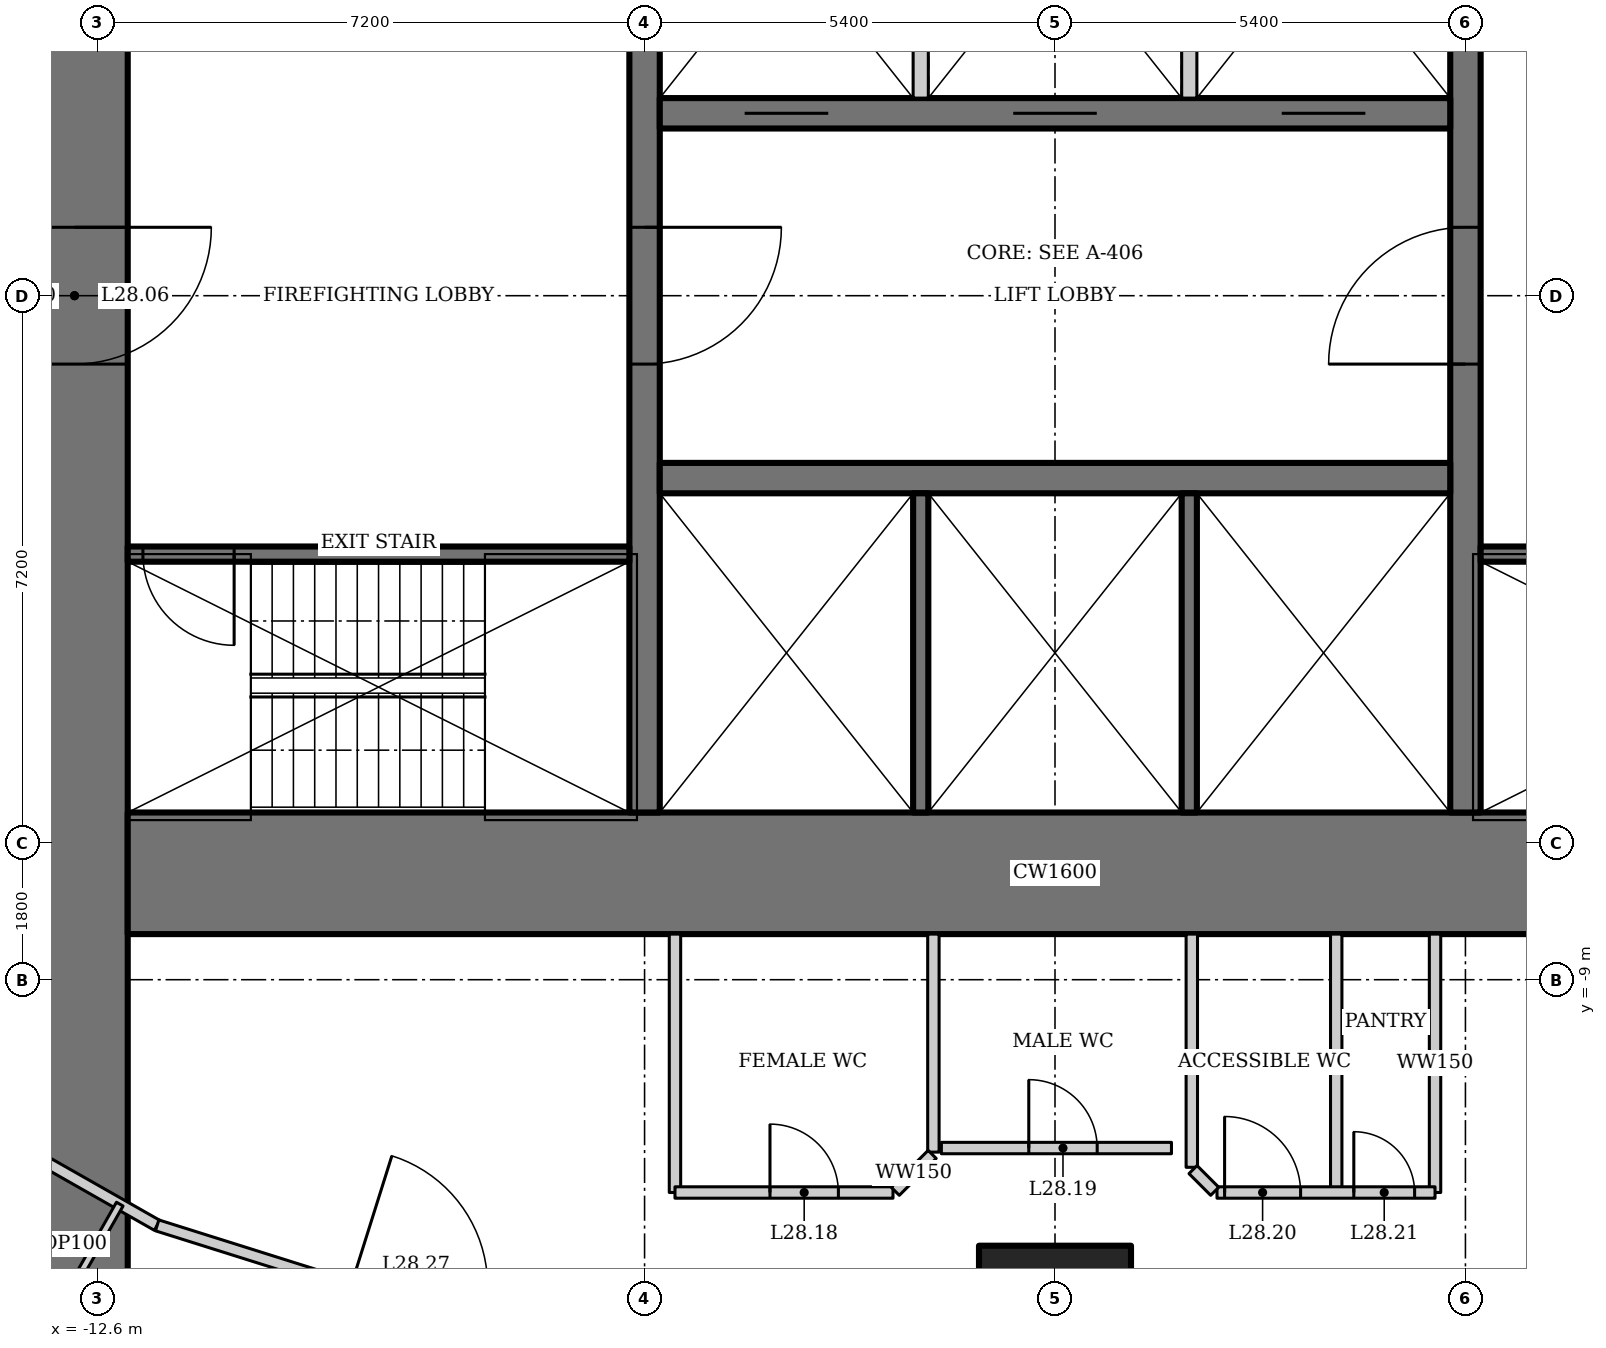
"""IFC4 building model, lengths in metres.
Left out: names, types, materials, properties, quantities, classifications, styles, units other than length and angle.
Written with IfcOpenShell. Run it as: python <this file> out.ifc"""

import sys

from ifc_helpers import new_model, si_unit, direction, frame, frame_2d, origin, origin_2d, place, context, subcontext, project, spatial, rectangle, hollow_rectangle, extrude, element, fill, save


model = new_model("IFC4")
c1 = context("Model", 3, precision=1e-05, world=origin(), true_north=direction((0.0, 1.0)))
c2 = subcontext(c1, "Body", "Model", "MODEL_VIEW")
j1 = project(units=[si_unit("LENGTHUNIT", "METRE"), si_unit("PLANEANGLEUNIT", "RADIAN")], contexts=[c1])
p1 = place(None, origin())
s1 = spatial("IfcSite", under=j1, at=p1, CompositionType="ELEMENT")
p2 = place(p1, origin())
s2 = spatial("IfcBuilding", under=s1, at=p2, CompositionType="ELEMENT")
p3 = place(p2, frame((0.0, 0.0, 121.6)))
s3 = spatial("IfcBuildingStorey", under=s2, at=p3, CompositionType="ELEMENT", Elevation=121.6)
p4 = place(p3, frame((0.0, -13.5, 0.0), z_axis=(0.0, 0.0, 1.0), x_axis=(1.0, 0.0, 0.0)))
e1 = element("IfcColumn", 1, at=p4, inside=s3, PredefinedType="COLUMN", context=c2, shape_type="SweptSolid", body=[
    extrude(hollow_rectangle(XDim=2.0, YDim=2.0, WallThickness=0.17, at=origin_2d()), origin(), (0.0, 0.0, 1.0), 4.2),
])
p5 = place(p3, frame((-12.9, 13.0, 0.0), z_axis=(0.0, 0.0, 1.0), x_axis=(0.0, -1.0, 0.0)))
e2 = element("IfcWall", 2, at=p5, inside=s3, PredefinedType="SHEAR", context=c2, shape_type="SweptSolid", body=[
    extrude(rectangle(XDim=26.0, YDim=1.4, at=frame_2d((13.0, 0.0))), origin(), (0.0, 0.0, 1.0), 4.2),
])
p6 = place(p5, frame((12.1, 0.0, 0.0)))
e3 = element("IfcOpeningElement", 3, at=p6, cuts=e2, PredefinedType="OPENING", context=c2, shape_type="SweptSolid", body=[
    extrude(rectangle(XDim=1.8, YDim=2.1, at=frame_2d((0.9, 1.05))), frame((0.0, 0.71, 0.0), z_axis=(0.0, -1.0, 0.0), x_axis=(1.0, 0.0, 0.0)), (0.0, 0.0, 1.0), 1.42),
])
p7 = place(p3, frame((-12.2, -7.6, 0.0), z_axis=(0.0, 0.0, 1.0), x_axis=(1.0, 0.0, 0.0)))
e4 = element("IfcWall", 4, at=p7, inside=s3, PredefinedType="SHEAR", context=c2, shape_type="SweptSolid", body=[
    extrude(rectangle(XDim=24.4, YDim=1.6, at=frame_2d((12.2, 0.0))), origin(), (0.0, 0.0, 1.0), 4.2),
])
p8 = place(p3, frame((5.4, -6.8, 0.0), z_axis=(0.0, 0.0, 1.0), x_axis=(0.0, 1.0, 0.0)))
e5 = element("IfcWall", 5, at=p8, inside=s3, PredefinedType="SHEAR", context=c2, shape_type="SweptSolid", body=[
    extrude(rectangle(XDim=13.6, YDim=0.4, at=frame_2d((6.8, 0.0))), origin(), (0.0, 0.0, 1.0), 4.2),
])
p9 = place(p8, frame((5.9, 0.0, 0.0)))
e6 = element("IfcOpeningElement", 6, at=p9, cuts=e5, PredefinedType="OPENING", context=c2, shape_type="SweptSolid", body=[
    extrude(rectangle(XDim=1.8, YDim=2.1, at=frame_2d((0.9, 1.05))), frame((0.0, 0.21, 0.0), z_axis=(0.0, -1.0, 0.0), x_axis=(1.0, 0.0, 0.0)), (0.0, 0.0, 1.0), 0.42),
])
p10 = place(p3, frame((-5.4, 6.8, 0.0), z_axis=(0.0, 0.0, 1.0), x_axis=(0.0, -1.0, 0.0)))
e7 = element("IfcWall", 7, at=p10, inside=s3, PredefinedType="SHEAR", context=c2, shape_type="SweptSolid", body=[
    extrude(rectangle(XDim=13.6, YDim=0.4, at=frame_2d((6.8, 0.0))), origin(), (0.0, 0.0, 1.0), 4.2),
])
p11 = place(p10, frame((5.9, 0.0, 0.0)))
e8 = element("IfcOpeningElement", 8, at=p11, cuts=e7, PredefinedType="OPENING", context=c2, shape_type="SweptSolid", body=[
    extrude(rectangle(XDim=1.8, YDim=2.1, at=frame_2d((0.9, 1.05))), frame((0.0, 0.21, 0.0), z_axis=(0.0, -1.0, 0.0), x_axis=(1.0, 0.0, 0.0)), (0.0, 0.0, 1.0), 0.42),
])
p12 = place(p3, frame((-5.2, -2.4, 0.0), z_axis=(0.0, 0.0, 1.0), x_axis=(1.0, 0.0, 0.0)))
e9 = element("IfcWall", 9, at=p12, inside=s3, PredefinedType="SHEAR", context=c2, shape_type="SweptSolid", body=[
    extrude(rectangle(XDim=10.4, YDim=0.4, at=frame_2d((5.2, 0.0))), origin(), (0.0, 0.0, 1.0), 4.2),
])
for number, where, z_axis, x_axis in (
    (10, (-1.767, -2.6, 0.0), (0.0, 0.0, 1.0), (0.0, -1.0, 0.0)),
    (11, (1.767, -2.6, 0.0), (0.0, 0.0, 1.0), (0.0, -1.0, 0.0)),
):
    element("IfcWall", number, at=place(p3, frame(where, z_axis=z_axis, x_axis=x_axis)), inside=s3, PredefinedType="SOLIDWALL", context=c2, shape_type="SweptSolid", body=[
        extrude(rectangle(XDim=4.2, YDim=0.2, at=frame_2d((2.1, 0.0))), origin(), (0.0, 0.0, 1.0), 4.2),
    ])
p13 = place(p3, frame((5.2, 2.4, 0.0), z_axis=(0.0, 0.0, 1.0), x_axis=(-1.0, 0.0, 0.0)))
e12 = element("IfcWall", 12, at=p13, inside=s3, PredefinedType="SHEAR", context=c2, shape_type="SweptSolid", body=[
    extrude(rectangle(XDim=10.4, YDim=0.4, at=frame_2d((5.2, 0.0))), origin(), (0.0, 0.0, 1.0), 4.2),
])
p14 = place(p13, frame((8.183, 0.0, 0.0)))
e13 = element("IfcOpeningElement", 13, at=p14, cuts=e12, PredefinedType="OPENING", context=c2, shape_type="SweptSolid", body=[
    extrude(rectangle(XDim=1.1, YDim=2.2, at=frame_2d((0.55, 1.1))), frame((0.0, 0.21, 0.0), z_axis=(0.0, -1.0, 0.0), x_axis=(1.0, 0.0, 0.0)), (0.0, 0.0, 1.0), 0.42),
])
p15 = place(p13, frame((4.65, 0.0, 0.0)))
e14 = element("IfcOpeningElement", 14, at=p15, cuts=e12, PredefinedType="OPENING", context=c2, shape_type="SweptSolid", body=[
    extrude(rectangle(XDim=1.1, YDim=2.2, at=frame_2d((0.55, 1.1))), frame((0.0, 0.21, 0.0), z_axis=(0.0, -1.0, 0.0), x_axis=(1.0, 0.0, 0.0)), (0.0, 0.0, 1.0), 0.42),
])
p16 = place(p13, frame((1.117, 0.0, 0.0)))
e15 = element("IfcOpeningElement", 15, at=p16, cuts=e12, PredefinedType="OPENING", context=c2, shape_type="SweptSolid", body=[
    extrude(rectangle(XDim=1.1, YDim=2.2, at=frame_2d((0.55, 1.1))), frame((0.0, 0.21, 0.0), z_axis=(0.0, -1.0, 0.0), x_axis=(1.0, 0.0, 0.0)), (0.0, 0.0, 1.0), 0.42),
])
for number, where, z_axis, x_axis in (
    (16, (-1.767, 2.6, 0.0), (0.0, 0.0, 1.0), (0.0, 1.0, 0.0)),
    (17, (1.767, 2.6, 0.0), (0.0, 0.0, 1.0), (0.0, 1.0, 0.0)),
):
    element("IfcWall", number, at=place(p3, frame(where, z_axis=z_axis, x_axis=x_axis)), inside=s3, PredefinedType="SOLIDWALL", context=c2, shape_type="SweptSolid", body=[
        extrude(rectangle(XDim=4.2, YDim=0.2, at=frame_2d((2.1, 0.0))), origin(), (0.0, 0.0, 1.0), 4.2),
    ])
p17 = place(p3, frame((5.6, -3.4, 0.0), z_axis=(0.0, 0.0, 1.0), x_axis=(1.0, 0.0, 0.0)))
e18 = element("IfcWall", 18, at=p17, inside=s3, PredefinedType="SHEAR", context=c2, shape_type="SweptSolid", body=[
    extrude(rectangle(XDim=6.6, YDim=0.2, at=frame_2d((3.3, 0.0))), origin(), (0.0, 0.0, 1.0), 4.2),
])
p18 = place(p17, frame((5.2, 0.0, 0.0)))
e19 = element("IfcOpeningElement", 19, at=p18, cuts=e18, PredefinedType="OPENING", context=c2, shape_type="SweptSolid", body=[
    extrude(rectangle(XDim=1.2, YDim=2.1, at=frame_2d((0.6, 1.05))), frame((0.0, 0.11, 0.0), z_axis=(0.0, -1.0, 0.0), x_axis=(1.0, 0.0, 0.0)), (0.0, 0.0, 1.0), 0.22),
])
p19 = place(p3, frame((-5.6, -3.4, 0.0), z_axis=(0.0, 0.0, 1.0), x_axis=(-1.0, 0.0, 0.0)))
e20 = element("IfcWall", 20, at=p19, inside=s3, PredefinedType="SHEAR", context=c2, shape_type="SweptSolid", body=[
    extrude(rectangle(XDim=6.6, YDim=0.2, at=frame_2d((3.3, 0.0))), origin(), (0.0, 0.0, 1.0), 4.2),
])
p20 = place(p19, frame((5.2, 0.0, 0.0)))
e21 = element("IfcOpeningElement", 21, at=p20, cuts=e20, PredefinedType="OPENING", context=c2, shape_type="SweptSolid", body=[
    extrude(rectangle(XDim=1.2, YDim=2.1, at=frame_2d((0.6, 1.05))), frame((0.0, 0.11, 0.0), z_axis=(0.0, -1.0, 0.0), x_axis=(1.0, 0.0, 0.0)), (0.0, 0.0, 1.0), 0.22),
])
p21 = place(p3, frame((-16.623, -9.499, 0.0), z_axis=(0.0, 0.0, 1.0), x_axis=(0.869375991036, -0.494151177485, 0.0)))
e22 = element("IfcWall", 22, at=p21, inside=s3, PredefinedType="PARTITIONING", context=c2, shape_type="SweptSolid", body=[
    extrude(rectangle(XDim=5.532, YDim=0.15, at=frame_2d((2.766, 0.0))), origin(), (0.0, 0.0, 1.0), 4.05),
])
p22 = place(p3, frame((-11.813, -12.232, 0.0), z_axis=(0.0, 0.0, 1.0), x_axis=(0.953893934057, -0.300143903101, 0.0)))
e23 = element("IfcWall", 23, at=p22, inside=s3, PredefinedType="PARTITIONING", context=c2, shape_type="SweptSolid", body=[
    extrude(rectangle(XDim=5.042, YDim=0.15, at=frame_2d((2.521, 0.0))), origin(), (0.0, 0.0, 1.0), 4.05),
])
p23 = place(p22, frame((2.671, 0.0, 0.0)))
e24 = element("IfcOpeningElement", 24, at=p23, cuts=e23, PredefinedType="OPENING", context=c2, shape_type="SweptSolid", body=[
    extrude(rectangle(XDim=1.8, YDim=2.1, at=frame_2d((0.9, 1.05))), frame((0.0, 0.085, 0.0), z_axis=(0.0, -1.0, 0.0), x_axis=(1.0, 0.0, 0.0)), (0.0, 0.0, 1.0), 0.17),
])
for number, where, z_axis, x_axis in (
    (25, (-5.0, -8.4, 0.0), (0.0, 0.0, 1.0), (0.0, -1.0, 0.0)),
    (26, (5.0, -8.4, 0.0), (0.0, 0.0, 1.0), (0.0, -1.0, 0.0)),
    (27, (3.7, -8.4, 0.0), (0.0, 0.0, 1.0), (0.0, -1.0, 0.0)),
):
    element("IfcWall", number, at=place(p3, frame(where, z_axis=z_axis, x_axis=x_axis)), inside=s3, PredefinedType="SOLIDWALL", context=c2, shape_type="SweptSolid", body=[
        extrude(rectangle(XDim=3.4, YDim=0.15, at=frame_2d((1.7, 0.0))), origin(), (0.0, 0.0, 1.0), 4.05),
    ])
p24 = place(p3, frame((-12.9, -13.0, 0.0), z_axis=(0.0, 0.0, 1.0), x_axis=(0.494173075358, 0.869363543974, 0.0)))
e28 = element("IfcWall", 28, at=p24, inside=s3, PredefinedType="PARTITIONING", context=c2, shape_type="SweptSolid", body=[
    extrude(rectangle(XDim=1.204, YDim=0.1, at=frame_2d((0.602, 0.0))), origin(), (0.0, 0.0, 1.0), 4.05),
])
p25 = place(p3, frame((-5.0, -11.8, 0.0), z_axis=(0.0, 0.0, 1.0), x_axis=(1.0, 0.0, 0.0)))
e29 = element("IfcWall", 29, at=p25, inside=s3, PredefinedType="SOLIDWALL", context=c2, shape_type="SweptSolid", body=[
    extrude(rectangle(XDim=2.869, YDim=0.15, at=frame_2d((1.434, 0.0))), origin(), (0.0, 0.0, 1.0), 4.05),
])
p26 = place(p25, frame((1.25, 0.0, 0.0)))
e30 = element("IfcOpeningElement", 30, at=p26, cuts=e29, PredefinedType="OPENING", context=c2, shape_type="SweptSolid", body=[
    extrude(rectangle(XDim=0.9, YDim=2.1, at=frame_2d((0.45, 1.05))), frame((0.0, 0.085, 0.0), z_axis=(0.0, -1.0, 0.0), x_axis=(1.0, 0.0, 0.0)), (0.0, 0.0, 1.0), 0.17),
])
p27 = place(p3, frame((2.131, -11.8, 0.0), z_axis=(0.0, 0.0, 1.0), x_axis=(1.0, 0.0, 0.0)))
e31 = element("IfcWall", 31, at=p27, inside=s3, PredefinedType="SOLIDWALL", context=c2, shape_type="SweptSolid", body=[
    extrude(rectangle(XDim=2.869, YDim=0.15, at=frame_2d((1.434, 0.0))), origin(), (0.0, 0.0, 1.0), 4.05),
])
p28 = place(p27, frame((0.1, 0.0, 0.0)))
e32 = element("IfcOpeningElement", 32, at=p28, cuts=e31, PredefinedType="OPENING", context=c2, shape_type="SweptSolid", body=[
    extrude(rectangle(XDim=1.0, YDim=2.1, at=frame_2d((0.5, 1.05))), frame((0.0, 0.085, 0.0), z_axis=(0.0, -1.0, 0.0), x_axis=(1.0, 0.0, 0.0)), (0.0, 0.0, 1.0), 0.17),
])
p29 = place(p27, frame((1.8, 0.0, 0.0)))
e33 = element("IfcOpeningElement", 33, at=p29, cuts=e31, PredefinedType="OPENING", context=c2, shape_type="SweptSolid", body=[
    extrude(rectangle(XDim=0.8, YDim=2.1, at=frame_2d((0.4, 1.05))), frame((0.0, 0.085, 0.0), z_axis=(0.0, -1.0, 0.0), x_axis=(1.0, 0.0, 0.0)), (0.0, 0.0, 1.0), 0.17),
])
p30 = place(p3, frame((-1.6, -8.4, 0.0), z_axis=(0.0, 0.0, 1.0), x_axis=(0.0, -1.0, 0.0)))
e34 = element("IfcWall", 34, at=p30, inside=s3, PredefinedType="SOLIDWALL", context=c2, shape_type="SweptSolid", body=[
    extrude(rectangle(XDim=2.869, YDim=0.15, at=frame_2d((1.434, 0.0))), origin(), (0.0, 0.0, 1.0), 4.05),
])
p31 = place(p3, frame((1.8, -8.4, 0.0), z_axis=(0.0, 0.0, 1.0), x_axis=(0.0, -1.0, 0.0)))
e35 = element("IfcWall", 35, at=p31, inside=s3, PredefinedType="SOLIDWALL", context=c2, shape_type="SweptSolid", body=[
    extrude(rectangle(XDim=3.069, YDim=0.15, at=frame_2d((1.534, 0.0))), origin(), (0.0, 0.0, 1.0), 4.05),
])
p32 = place(p3, frame((-2.101, -11.784, 0.0), z_axis=(0.0, 0.0, 1.0), x_axis=(0.706928959799, 0.707284557867, 0.0)))
e36 = element("IfcWall", 36, at=p32, inside=s3, PredefinedType="SOLIDWALL", context=c2, shape_type="SweptSolid", body=[
    extrude(rectangle(XDim=0.687, YDim=0.15, at=frame_2d((0.343, 0.0))), origin(), (0.0, 0.0, 1.0), 4.05),
])
p33 = place(p3, frame((-1.495, -11.215, 0.0), z_axis=(0.0, 0.0, 1.0), x_axis=(1.0, 0.0, 0.0)))
e37 = element("IfcWall", 37, at=p33, inside=s3, PredefinedType="SOLIDWALL", context=c2, shape_type="SweptSolid", body=[
    extrude(rectangle(XDim=3.027, YDim=0.15, at=frame_2d((1.514, 0.0))), origin(), (0.0, 0.0, 1.0), 4.05),
])
p34 = place(p33, frame((1.15, 0.0, 0.0)))
e38 = element("IfcOpeningElement", 38, at=p34, cuts=e37, PredefinedType="OPENING", context=c2, shape_type="SweptSolid", body=[
    extrude(rectangle(XDim=0.9, YDim=2.1, at=frame_2d((0.45, 1.05))), frame((0.0, 0.085, 0.0), z_axis=(0.0, -1.0, 0.0), x_axis=(1.0, 0.0, 0.0)), (0.0, 0.0, 1.0), 0.17),
])
p35 = place(p3, frame((1.816, -11.499, 0.0), z_axis=(0.0, 0.0, 1.0), x_axis=(0.706804405012, -0.707409028113, 0.0)))
e39 = element("IfcWall", 39, at=p35, inside=s3, PredefinedType="SOLIDWALL", context=c2, shape_type="SweptSolid", body=[
    extrude(rectangle(XDim=0.404, YDim=0.15, at=frame_2d((0.202, 0.0))), origin(), (0.0, 0.0, 1.0), 4.05),
])
p36 = place(p9, origin())
e40 = element("IfcDoor", 40, at=p36, inside=s3, OperationType="DOUBLE_DOOR_DOUBLE_SWING", PredefinedType="DOOR", context=c2, shape_type="SweptSolid", body=[
    extrude(rectangle(XDim=1.8, YDim=2.1, at=frame_2d((0.9, 1.05))), frame((0.0, 0.025, 0.0), z_axis=(0.0, -1.0, 0.0), x_axis=(1.0, 0.0, 0.0)), (0.0, 0.0, 1.0), 0.05),
])
fill(e6, e40)
p37 = place(p11, origin())
e41 = element("IfcDoor", 41, at=p37, inside=s3, OperationType="DOUBLE_DOOR_DOUBLE_SWING", PredefinedType="DOOR", context=c2, shape_type="SweptSolid", body=[
    extrude(rectangle(XDim=1.8, YDim=2.1, at=frame_2d((0.9, 1.05))), frame((0.0, 0.025, 0.0), z_axis=(0.0, -1.0, 0.0), x_axis=(1.0, 0.0, 0.0)), (0.0, 0.0, 1.0), 0.05),
])
fill(e8, e41)
p38 = place(p20, origin())
e42 = element("IfcDoor", 42, at=p38, inside=s3, OperationType="SINGLE_SWING_RIGHT", PredefinedType="DOOR", context=c2, shape_type="SweptSolid", body=[
    extrude(rectangle(XDim=1.2, YDim=2.1, at=frame_2d((0.6, 1.05))), frame((0.0, 0.025, 0.0), z_axis=(0.0, -1.0, 0.0), x_axis=(1.0, 0.0, 0.0)), (0.0, 0.0, 1.0), 0.05),
])
fill(e21, e42)
p39 = place(p6, origin())
e43 = element("IfcDoor", 43, at=p39, inside=s3, OperationType="DOUBLE_DOOR_DOUBLE_SWING", PredefinedType="DOOR", context=c2, shape_type="SweptSolid", body=[
    extrude(rectangle(XDim=1.8, YDim=2.1, at=frame_2d((0.9, 1.05))), frame((0.0, 0.025, 0.0), z_axis=(0.0, -1.0, 0.0), x_axis=(1.0, 0.0, 0.0)), (0.0, 0.0, 1.0), 0.05),
])
fill(e3, e43)
p40 = place(p14, origin())
e44 = element("IfcDoor", 44, at=p40, inside=s3, OperationType="DOUBLE_DOOR_SLIDING", PredefinedType="DOOR", context=c2, shape_type="SweptSolid", body=[
    extrude(rectangle(XDim=1.1, YDim=2.2, at=frame_2d((0.55, 1.1))), frame((0.0, 0.025, 0.0), z_axis=(0.0, -1.0, 0.0), x_axis=(1.0, 0.0, 0.0)), (0.0, 0.0, 1.0), 0.05),
])
fill(e13, e44)
p41 = place(p15, origin())
e45 = element("IfcDoor", 45, at=p41, inside=s3, OperationType="DOUBLE_DOOR_SLIDING", PredefinedType="DOOR", context=c2, shape_type="SweptSolid", body=[
    extrude(rectangle(XDim=1.1, YDim=2.2, at=frame_2d((0.55, 1.1))), frame((0.0, 0.025, 0.0), z_axis=(0.0, -1.0, 0.0), x_axis=(1.0, 0.0, 0.0)), (0.0, 0.0, 1.0), 0.05),
])
fill(e14, e45)
p42 = place(p16, origin())
e46 = element("IfcDoor", 46, at=p42, inside=s3, OperationType="DOUBLE_DOOR_SLIDING", PredefinedType="DOOR", context=c2, shape_type="SweptSolid", body=[
    extrude(rectangle(XDim=1.1, YDim=2.2, at=frame_2d((0.55, 1.1))), frame((0.0, 0.025, 0.0), z_axis=(0.0, -1.0, 0.0), x_axis=(1.0, 0.0, 0.0)), (0.0, 0.0, 1.0), 0.05),
])
fill(e15, e46)
p43 = place(p26, origin())
e47 = element("IfcDoor", 47, at=p43, inside=s3, OperationType="SINGLE_SWING_LEFT", PredefinedType="DOOR", context=c2, shape_type="SweptSolid", body=[
    extrude(rectangle(XDim=0.9, YDim=2.1, at=frame_2d((0.45, 1.05))), frame((0.0, 0.025, 0.0), z_axis=(0.0, -1.0, 0.0), x_axis=(1.0, 0.0, 0.0)), (0.0, 0.0, 1.0), 0.05),
])
fill(e30, e47)
p44 = place(p34, origin())
e48 = element("IfcDoor", 48, at=p44, inside=s3, OperationType="SINGLE_SWING_LEFT", PredefinedType="DOOR", context=c2, shape_type="SweptSolid", body=[
    extrude(rectangle(XDim=0.9, YDim=2.1, at=frame_2d((0.45, 1.05))), frame((0.0, 0.025, 0.0), z_axis=(0.0, -1.0, 0.0), x_axis=(1.0, 0.0, 0.0)), (0.0, 0.0, 1.0), 0.05),
])
fill(e38, e48)
p45 = place(p28, origin())
e49 = element("IfcDoor", 49, at=p45, inside=s3, OperationType="SINGLE_SWING_LEFT", PredefinedType="DOOR", context=c2, shape_type="SweptSolid", body=[
    extrude(rectangle(XDim=1.0, YDim=2.1, at=frame_2d((0.5, 1.05))), frame((0.0, 0.025, 0.0), z_axis=(0.0, -1.0, 0.0), x_axis=(1.0, 0.0, 0.0)), (0.0, 0.0, 1.0), 0.05),
])
fill(e32, e49)
p46 = place(p29, origin())
e50 = element("IfcDoor", 50, at=p46, inside=s3, OperationType="SINGLE_SWING_LEFT", PredefinedType="DOOR", context=c2, shape_type="SweptSolid", body=[
    extrude(rectangle(XDim=0.8, YDim=2.1, at=frame_2d((0.4, 1.05))), frame((0.0, 0.025, 0.0), z_axis=(0.0, -1.0, 0.0), x_axis=(1.0, 0.0, 0.0)), (0.0, 0.0, 1.0), 0.05),
])
fill(e33, e50)
save(model, sys.argv[1])
